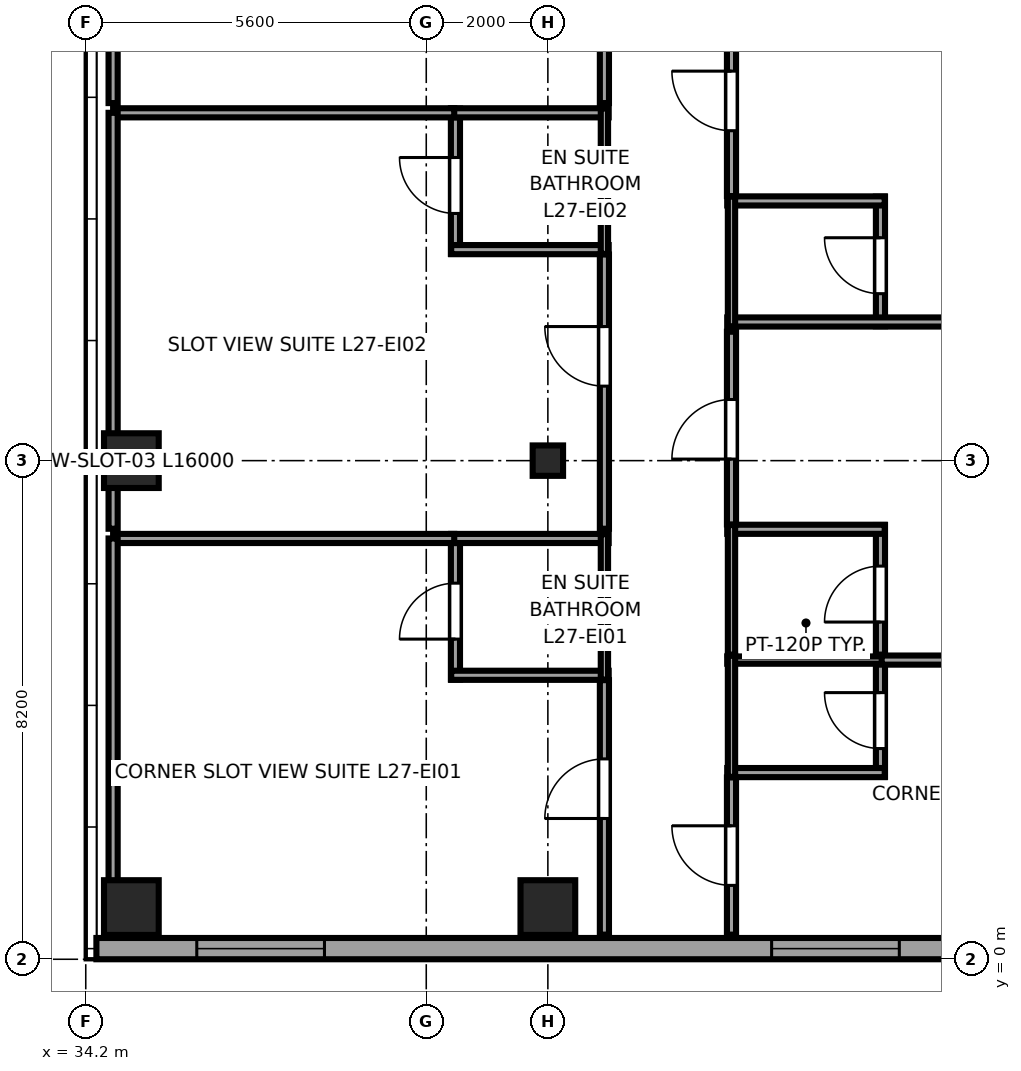
"""IFC4 building model, lengths in metres.
Left out: names, types, materials, properties, quantities, classifications, styles, units other than length and angle.
Written with IfcOpenShell. Run it as: python <this file> out.ifc"""

import sys

from ifc_helpers import new_model, si_unit, direction, frame, frame_2d, origin, origin_2d, place, context, subcontext, project, spatial, rectangle, i_section, extrude, source, transform, mapped, element, fill, save


model = new_model("IFC4")
c1 = context("Model", 3, precision=1e-05, world=origin(), true_north=direction((0.0, 1.0)))
c2 = subcontext(c1, "Body", "Model", "MODEL_VIEW")
j1 = project(units=[si_unit("LENGTHUNIT", "METRE"), si_unit("PLANEANGLEUNIT", "RADIAN")], contexts=[c1])
p1 = place(None, origin())
s1 = spatial("IfcSite", under=j1, at=p1, CompositionType="ELEMENT")
p2 = place(p1, origin())
s2 = spatial("IfcBuilding", under=s1, at=p2, CompositionType="ELEMENT")
p3 = place(p2, frame((0.0, 0.0, 108.0)))
s3 = spatial("IfcBuildingStorey", under=s2, at=p3, CompositionType="ELEMENT", Elevation=108.0)
m1 = source(origin(), c2, "Body", "SweptSolid", [
    extrude(rectangle(XDim=0.9, YDim=0.9, at=origin_2d()), origin(), (0.0, 0.0, 1.0), 3.55),
])
for number, where, z_axis, x_axis in (
    (1, (34.95, 0.85, 0.0), (0.0, 0.0, 1.0), (1.0, 0.0, 0.0)),
    (2, (34.95, 8.2, 0.0), (0.0, 0.0, 1.0), (1.0, 0.0, 0.0)),
    (3, (41.8, 0.85, 0.0), (0.0, 0.0, 1.0), (1.0, 0.0, 0.0)),
):
    element("IfcColumn", number, at=place(p3, frame(where, z_axis=z_axis, x_axis=x_axis)), inside=s3, PredefinedType="COLUMN", context=c2, shape_type="MappedRepresentation", body=[
        mapped(m1, transform((0.0, 0.0, 0.0), x_axis=(1.0, 0.0, 0.0), y_axis=(0.0, 1.0, 0.0), z_axis=(0.0, 0.0, 1.0), scale=1.0)),
    ])
m2 = source(origin(), c2, "Body", "SweptSolid", [
    extrude(i_section(OverallWidth=0.5, OverallDepth=0.5, WebThickness=0.022, FlangeThickness=0.034, at=origin_2d()), origin(), (0.0, 0.0, 1.0), 3.55),
])
p4 = place(p3, frame((41.8, 8.2, 0.0), z_axis=(0.0, 0.0, 1.0), x_axis=(1.0, 0.0, 0.0)))
e4 = element("IfcColumn", 4, at=p4, inside=s3, PredefinedType="COLUMN", context=c2, shape_type="MappedRepresentation", body=[
    mapped(m2, transform((0.0, 0.0, 0.0), x_axis=(1.0, 0.0, 0.0), y_axis=(0.0, 1.0, 0.0), z_axis=(0.0, 0.0, 1.0), scale=1.0)),
])
p5 = place(p3, frame((34.375, 0.175, 0.0), z_axis=(0.0, 0.0, 1.0), x_axis=(1.0, 0.0, 0.0)))
e5 = element("IfcWall", 5, at=p5, inside=s3, PredefinedType="SOLIDWALL", context=c2, shape_type="SweptSolid", body=[
    extrude(rectangle(XDim=18.008, YDim=0.35, at=frame_2d((9.004, 0.0))), origin(), (0.0, 0.0, 1.0), 3.37),
])
p6 = place(p5, frame((1.651, 0.0, 0.68)))
e6 = element("IfcOpeningElement", 6, at=p6, cuts=e5, PredefinedType="OPENING", context=c2, shape_type="SweptSolid", body=[
    extrude(rectangle(XDim=2.1, YDim=1.9, at=frame_2d((1.05, 0.95))), frame((0.0, 0.185, 0.0), z_axis=(0.0, -1.0, 0.0), x_axis=(1.0, 0.0, 0.0)), (0.0, 0.0, 1.0), 0.37),
])
p7 = place(p5, frame((11.105, 0.0, 0.68)))
e7 = element("IfcOpeningElement", 7, at=p7, cuts=e5, PredefinedType="OPENING", context=c2, shape_type="SweptSolid", body=[
    extrude(rectangle(XDim=2.1, YDim=1.9, at=frame_2d((1.05, 0.95))), frame((0.0, 0.185, 0.0), z_axis=(0.0, -1.0, 0.0), x_axis=(1.0, 0.0, 0.0)), (0.0, 0.0, 1.0), 0.37),
])
p8 = place(p3, frame((40.28, 4.6, 0.0), z_axis=(0.0, 0.0, 1.0), x_axis=(0.0, 1.0, 0.0)))
e8 = element("IfcWall", 8, at=p8, inside=s3, PredefinedType="PARTITIONING", context=c2, shape_type="SweptSolid", body=[
    extrude(rectangle(XDim=2.39, YDim=0.15, at=frame_2d((1.195, 0.0))), origin(), (0.0, 0.0, 1.0), 3.37),
])
p9 = place(p8, frame((0.665, 0.0, 0.0)))
e9 = element("IfcOpeningElement", 9, at=p9, cuts=e8, PredefinedType="OPENING", context=c2, shape_type="SweptSolid", body=[
    extrude(rectangle(XDim=0.92, YDim=2.01, at=frame_2d((0.46, 1.005))), frame((0.0, 0.085, 0.0), z_axis=(0.0, -1.0, 0.0), x_axis=(1.0, 0.0, 0.0)), (0.0, 0.0, 1.0), 0.17),
])
for number, where, z_axis, x_axis in (
    (10, (40.21, 4.67, 0.0), (0.0, 0.0, 1.0), (1.0, 0.0, 0.0)),
    (11, (40.21, 6.92, 0.0), (0.0, 0.0, 1.0), (1.0, 0.0, 0.0)),
):
    element("IfcWall", number, at=place(p3, frame(where, z_axis=z_axis, x_axis=x_axis)), inside=s3, PredefinedType="PARTITIONING", context=c2, shape_type="SweptSolid", body=[
        extrude(rectangle(XDim=2.59, YDim=0.15, at=frame_2d((1.295, 0.0))), origin(), (0.0, 0.0, 1.0), 3.37),
    ])
p10 = place(p3, frame((42.73, 4.6, 0.0), z_axis=(0.0, 0.0, 1.0), x_axis=(0.0, 1.0, 0.0)))
e12 = element("IfcWall", 12, at=p10, inside=s3, PredefinedType="PLUMBINGWALL", context=c2, shape_type="SweptSolid", body=[
    extrude(rectangle(XDim=2.39, YDim=0.12, at=frame_2d((1.195, 0.0))), origin(), (0.0, 0.0, 1.0), 3.37),
])
p11 = place(p3, frame((40.28, 11.6, 0.0), z_axis=(0.0, 0.0, 1.0), x_axis=(0.0, 1.0, 0.0)))
e13 = element("IfcWall", 13, at=p11, inside=s3, PredefinedType="PARTITIONING", context=c2, shape_type="SweptSolid", body=[
    extrude(rectangle(XDim=2.39, YDim=0.15, at=frame_2d((1.195, 0.0))), origin(), (0.0, 0.0, 1.0), 3.37),
])
p12 = place(p11, frame((0.665, 0.0, 0.0)))
e14 = element("IfcOpeningElement", 14, at=p12, cuts=e13, PredefinedType="OPENING", context=c2, shape_type="SweptSolid", body=[
    extrude(rectangle(XDim=0.92, YDim=2.01, at=frame_2d((0.46, 1.005))), frame((0.0, 0.085, 0.0), z_axis=(0.0, -1.0, 0.0), x_axis=(1.0, 0.0, 0.0)), (0.0, 0.0, 1.0), 0.17),
])
for number, where, z_axis, x_axis in (
    (15, (40.21, 11.67, 0.0), (0.0, 0.0, 1.0), (1.0, 0.0, 0.0)),
    (16, (40.21, 13.92, 0.0), (0.0, 0.0, 1.0), (1.0, 0.0, 0.0)),
):
    element("IfcWall", number, at=place(p3, frame(where, z_axis=z_axis, x_axis=x_axis)), inside=s3, PredefinedType="PARTITIONING", context=c2, shape_type="SweptSolid", body=[
        extrude(rectangle(XDim=2.59, YDim=0.15, at=frame_2d((1.295, 0.0))), origin(), (0.0, 0.0, 1.0), 3.37),
    ])
p13 = place(p3, frame((42.73, 11.6, 0.0), z_axis=(0.0, 0.0, 1.0), x_axis=(0.0, 1.0, 0.0)))
e17 = element("IfcWall", 17, at=p13, inside=s3, PredefinedType="PLUMBINGWALL", context=c2, shape_type="SweptSolid", body=[
    extrude(rectangle(XDim=2.39, YDim=0.12, at=frame_2d((1.195, 0.0))), origin(), (0.0, 0.0, 1.0), 3.37),
])
p14 = place(p3, frame((47.27, 3.0, 0.0), z_axis=(0.0, 0.0, 1.0), x_axis=(0.0, 1.0, 0.0)))
e18 = element("IfcWall", 18, at=p14, inside=s3, PredefinedType="PARTITIONING", context=c2, shape_type="SweptSolid", body=[
    extrude(rectangle(XDim=1.99, YDim=0.15, at=frame_2d((0.995, 0.0))), origin(), (0.0, 0.0, 1.0), 3.37),
])
p15 = place(p14, frame((0.465, 0.0, 0.0)))
e19 = element("IfcOpeningElement", 19, at=p15, cuts=e18, PredefinedType="OPENING", context=c2, shape_type="SweptSolid", body=[
    extrude(rectangle(XDim=0.92, YDim=2.01, at=frame_2d((0.46, 1.005))), frame((0.0, 0.085, 0.0), z_axis=(0.0, -1.0, 0.0), x_axis=(1.0, 0.0, 0.0)), (0.0, 0.0, 1.0), 0.17),
])
p16 = place(p3, frame((44.75, 3.07, 0.0), z_axis=(0.0, 0.0, 1.0), x_axis=(1.0, 0.0, 0.0)))
e20 = element("IfcWall", 20, at=p16, inside=s3, PredefinedType="PARTITIONING", context=c2, shape_type="SweptSolid", body=[
    extrude(rectangle(XDim=2.59, YDim=0.15, at=frame_2d((1.295, 0.0))), origin(), (0.0, 0.0, 1.0), 3.37),
])
p17 = place(p3, frame((44.75, 4.92, 0.0), z_axis=(0.0, 0.0, 1.0), x_axis=(1.0, 0.0, 0.0)))
e21 = element("IfcWall", 21, at=p17, inside=s3, PredefinedType="PLUMBINGWALL", context=c2, shape_type="SweptSolid", body=[
    extrude(rectangle(XDim=2.59, YDim=0.12, at=frame_2d((1.295, 0.0))), origin(), (0.0, 0.0, 1.0), 3.37),
])
p18 = place(p3, frame((44.82, 3.0, 0.0), z_axis=(0.0, 0.0, 1.0), x_axis=(0.0, 1.0, 0.0)))
e22 = element("IfcWall", 22, at=p18, inside=s3, PredefinedType="PLUMBINGWALL", context=c2, shape_type="SweptSolid", body=[
    extrude(rectangle(XDim=1.99, YDim=0.12, at=frame_2d((0.995, 0.0))), origin(), (0.0, 0.0, 1.0), 3.37),
])
p19 = place(p3, frame((47.27, 5.01, 0.0), z_axis=(0.0, 0.0, 1.0), x_axis=(0.0, 1.0, 0.0)))
e23 = element("IfcWall", 23, at=p19, inside=s3, PredefinedType="PARTITIONING", context=c2, shape_type="SweptSolid", body=[
    extrude(rectangle(XDim=2.131, YDim=0.15, at=frame_2d((1.065, 0.0))), origin(), (0.0, 0.0, 1.0), 3.37),
])
p20 = place(p19, frame((0.535, 0.0, 0.0)))
e24 = element("IfcOpeningElement", 24, at=p20, cuts=e23, PredefinedType="OPENING", context=c2, shape_type="SweptSolid", body=[
    extrude(rectangle(XDim=0.92, YDim=2.01, at=frame_2d((0.46, 1.005))), frame((0.0, 0.085, 0.0), z_axis=(0.0, -1.0, 0.0), x_axis=(1.0, 0.0, 0.0)), (0.0, 0.0, 1.0), 0.17),
])
p21 = place(p3, frame((44.75, 7.071, 0.0), z_axis=(0.0, 0.0, 1.0), x_axis=(1.0, 0.0, 0.0)))
e25 = element("IfcWall", 25, at=p21, inside=s3, PredefinedType="PARTITIONING", context=c2, shape_type="SweptSolid", body=[
    extrude(rectangle(XDim=2.59, YDim=0.15, at=frame_2d((1.295, 0.0))), origin(), (0.0, 0.0, 1.0), 3.37),
])
p22 = place(p3, frame((44.82, 5.01, 0.0), z_axis=(0.0, 0.0, 1.0), x_axis=(0.0, 1.0, 0.0)))
e26 = element("IfcWall", 26, at=p22, inside=s3, PredefinedType="PLUMBINGWALL", context=c2, shape_type="SweptSolid", body=[
    extrude(rectangle(XDim=2.131, YDim=0.12, at=frame_2d((1.065, 0.0))), origin(), (0.0, 0.0, 1.0), 3.37),
])
p23 = place(p3, frame((47.27, 10.41, 0.0), z_axis=(0.0, 0.0, 1.0), x_axis=(0.0, 1.0, 0.0)))
e27 = element("IfcWall", 27, at=p23, inside=s3, PredefinedType="PARTITIONING", context=c2, shape_type="SweptSolid", body=[
    extrude(rectangle(XDim=2.131, YDim=0.15, at=frame_2d((1.065, 0.0))), origin(), (0.0, 0.0, 1.0), 3.37),
])
p24 = place(p23, frame((0.535, 0.0, 0.0)))
e28 = element("IfcOpeningElement", 28, at=p24, cuts=e27, PredefinedType="OPENING", context=c2, shape_type="SweptSolid", body=[
    extrude(rectangle(XDim=0.92, YDim=2.01, at=frame_2d((0.46, 1.005))), frame((0.0, 0.085, 0.0), z_axis=(0.0, -1.0, 0.0), x_axis=(1.0, 0.0, 0.0)), (0.0, 0.0, 1.0), 0.17),
])
p25 = place(p3, frame((44.75, 10.48, 0.0), z_axis=(0.0, 0.0, 1.0), x_axis=(1.0, 0.0, 0.0)))
e29 = element("IfcWall", 29, at=p25, inside=s3, PredefinedType="PARTITIONING", context=c2, shape_type="SweptSolid", body=[
    extrude(rectangle(XDim=11.845, YDim=0.15, at=frame_2d((5.922, 0.0))), origin(), (0.0, 0.0, 1.0), 3.37),
])
p26 = place(p3, frame((44.75, 12.471, 0.0), z_axis=(0.0, 0.0, 1.0), x_axis=(1.0, 0.0, 0.0)))
e30 = element("IfcWall", 30, at=p26, inside=s3, PredefinedType="PARTITIONING", context=c2, shape_type="SweptSolid", body=[
    extrude(rectangle(XDim=2.59, YDim=0.15, at=frame_2d((1.295, 0.0))), origin(), (0.0, 0.0, 1.0), 3.37),
])
p27 = place(p3, frame((44.82, 10.41, 0.0), z_axis=(0.0, 0.0, 1.0), x_axis=(0.0, 1.0, 0.0)))
e31 = element("IfcWall", 31, at=p27, inside=s3, PredefinedType="PLUMBINGWALL", context=c2, shape_type="SweptSolid", body=[
    extrude(rectangle(XDim=2.131, YDim=0.12, at=frame_2d((1.065, 0.0))), origin(), (0.0, 0.0, 1.0), 3.37),
])
p28 = place(p3, frame((42.73, 0.405, 0.0), z_axis=(0.0, 0.0, 1.0), x_axis=(0.0, 1.0, 0.0)))
e32 = element("IfcWall", 32, at=p28, inside=s3, PredefinedType="PARTITIONING", context=c2, shape_type="SweptSolid", body=[
    extrude(rectangle(XDim=4.185, YDim=0.15, at=frame_2d((2.093, 0.0))), origin(), (0.0, 0.0, 1.0), 3.37),
])
p29 = place(p28, frame((1.91, 0.0, 0.0)))
e33 = element("IfcOpeningElement", 33, at=p29, cuts=e32, PredefinedType="OPENING", context=c2, shape_type="SweptSolid", body=[
    extrude(rectangle(XDim=0.98, YDim=2.12, at=frame_2d((0.49, 1.06))), frame((0.0, 0.085, 0.0), z_axis=(0.0, -1.0, 0.0), x_axis=(1.0, 0.0, 0.0)), (0.0, 0.0, 1.0), 0.17),
])
p30 = place(p3, frame((34.65, 6.92, 0.0), z_axis=(0.0, 0.0, 1.0), x_axis=(1.0, 0.0, 0.0)))
e34 = element("IfcWall", 34, at=p30, inside=s3, PredefinedType="PARTITIONING", context=c2, shape_type="SweptSolid", body=[
    extrude(rectangle(XDim=5.61, YDim=0.15, at=frame_2d((2.805, 0.0))), origin(), (0.0, 0.0, 1.0), 3.37),
])
p31 = place(p3, frame((34.65, 0.405, 0.0), z_axis=(0.0, 0.0, 1.0), x_axis=(0.0, 1.0, 0.0)))
e35 = element("IfcWall", 35, at=p31, inside=s3, PredefinedType="PARTITIONING", context=c2, shape_type="SweptSolid", body=[
    extrude(rectangle(XDim=6.515, YDim=0.15, at=frame_2d((3.257, 0.0))), origin(), (0.0, 0.0, 1.0), 3.37),
])
p32 = place(p3, frame((42.73, 7.08, 0.0), z_axis=(0.0, 0.0, 1.0), x_axis=(0.0, 1.0, 0.0)))
e36 = element("IfcWall", 36, at=p32, inside=s3, PredefinedType="PARTITIONING", context=c2, shape_type="SweptSolid", body=[
    extrude(rectangle(XDim=4.51, YDim=0.15, at=frame_2d((2.255, 0.0))), origin(), (0.0, 0.0, 1.0), 3.37),
])
p33 = place(p32, frame((2.345, 0.0, 0.0)))
e37 = element("IfcOpeningElement", 37, at=p33, cuts=e36, PredefinedType="OPENING", context=c2, shape_type="SweptSolid", body=[
    extrude(rectangle(XDim=0.98, YDim=2.12, at=frame_2d((0.49, 1.06))), frame((0.0, 0.085, 0.0), z_axis=(0.0, -1.0, 0.0), x_axis=(1.0, 0.0, 0.0)), (0.0, 0.0, 1.0), 0.17),
])
p34 = place(p3, frame((34.65, 13.92, 0.0), z_axis=(0.0, 0.0, 1.0), x_axis=(1.0, 0.0, 0.0)))
e38 = element("IfcWall", 38, at=p34, inside=s3, PredefinedType="PARTITIONING", context=c2, shape_type="SweptSolid", body=[
    extrude(rectangle(XDim=5.61, YDim=0.15, at=frame_2d((2.805, 0.0))), origin(), (0.0, 0.0, 1.0), 3.37),
])
p35 = place(p3, frame((34.65, 7.08, 0.0), z_axis=(0.0, 0.0, 1.0), x_axis=(0.0, 1.0, 0.0)))
e39 = element("IfcWall", 39, at=p35, inside=s3, PredefinedType="PARTITIONING", context=c2, shape_type="SweptSolid", body=[
    extrude(rectangle(XDim=6.84, YDim=0.15, at=frame_2d((3.42, 0.0))), origin(), (0.0, 0.0, 1.0), 3.37),
])
p36 = place(p3, frame((42.73, 14.08, 0.0), z_axis=(0.0, 0.0, 1.0), x_axis=(0.0, 1.0, 0.0)))
e40 = element("IfcWall", 40, at=p36, inside=s3, PredefinedType="PARTITIONING", context=c2, shape_type="SweptSolid", body=[
    extrude(rectangle(XDim=4.61, YDim=0.15, at=frame_2d((2.305, 0.0))), origin(), (0.0, 0.0, 1.0), 3.37),
])
p37 = place(p36, frame((3.145, 0.0, 0.0)))
e41 = element("IfcOpeningElement", 41, at=p37, cuts=e40, PredefinedType="OPENING", context=c2, shape_type="SweptSolid", body=[
    extrude(rectangle(XDim=0.98, YDim=2.12, at=frame_2d((0.49, 1.06))), frame((0.0, 0.085, 0.0), z_axis=(0.0, -1.0, 0.0), x_axis=(1.0, 0.0, 0.0)), (0.0, 0.0, 1.0), 0.17),
])
p38 = place(p3, frame((34.65, 14.08, 0.0), z_axis=(0.0, 0.0, 1.0), x_axis=(0.0, 1.0, 0.0)))
e42 = element("IfcWall", 42, at=p38, inside=s3, PredefinedType="PARTITIONING", context=c2, shape_type="SweptSolid", body=[
    extrude(rectangle(XDim=6.94, YDim=0.15, at=frame_2d((3.47, 0.0))), origin(), (0.0, 0.0, 1.0), 3.37),
])
p39 = place(p3, frame((44.82, 0.405, 0.0), z_axis=(0.0, 0.0, 1.0), x_axis=(0.0, 1.0, 0.0)))
e43 = element("IfcWall", 43, at=p39, inside=s3, PredefinedType="PARTITIONING", context=c2, shape_type="SweptSolid", body=[
    extrude(rectangle(XDim=2.585, YDim=0.15, at=frame_2d((1.292, 0.0))), origin(), (0.0, 0.0, 1.0), 3.37),
])
p40 = place(p39, frame((0.81, 0.0, 0.0)))
e44 = element("IfcOpeningElement", 44, at=p40, cuts=e43, PredefinedType="OPENING", context=c2, shape_type="SweptSolid", body=[
    extrude(rectangle(XDim=0.98, YDim=2.12, at=frame_2d((0.49, 1.06))), frame((0.0, 0.085, 0.0), z_axis=(0.0, -1.0, 0.0), x_axis=(1.0, 0.0, 0.0)), (0.0, 0.0, 1.0), 0.17),
])
p41 = place(p3, frame((47.29, 4.92, 0.0), z_axis=(0.0, 0.0, 1.0), x_axis=(1.0, 0.0, 0.0)))
e45 = element("IfcWall", 45, at=p41, inside=s3, PredefinedType="PARTITIONING", context=c2, shape_type="SweptSolid", body=[
    extrude(rectangle(XDim=9.305, YDim=0.15, at=frame_2d((4.652, 0.0))), origin(), (0.0, 0.0, 1.0), 3.37),
])
p42 = place(p3, frame((44.82, 7.151, 0.0), z_axis=(0.0, 0.0, 1.0), x_axis=(0.0, 1.0, 0.0)))
e46 = element("IfcWall", 46, at=p42, inside=s3, PredefinedType="PARTITIONING", context=c2, shape_type="SweptSolid", body=[
    extrude(rectangle(XDim=3.169, YDim=0.15, at=frame_2d((1.584, 0.0))), origin(), (0.0, 0.0, 1.0), 3.37),
])
p43 = place(p42, frame((1.074, 0.0, 0.0)))
e47 = element("IfcOpeningElement", 47, at=p43, cuts=e46, PredefinedType="OPENING", context=c2, shape_type="SweptSolid", body=[
    extrude(rectangle(XDim=0.98, YDim=2.12, at=frame_2d((0.49, 1.06))), frame((0.0, 0.085, 0.0), z_axis=(0.0, -1.0, 0.0), x_axis=(1.0, 0.0, 0.0)), (0.0, 0.0, 1.0), 0.17),
])
p44 = place(p3, frame((44.82, 12.551, 0.0), z_axis=(0.0, 0.0, 1.0), x_axis=(0.0, 1.0, 0.0)))
e48 = element("IfcWall", 48, at=p44, inside=s3, PredefinedType="PARTITIONING", context=c2, shape_type="SweptSolid", body=[
    extrude(rectangle(XDim=3.169, YDim=0.15, at=frame_2d((1.584, 0.0))), origin(), (0.0, 0.0, 1.0), 3.37),
])
p45 = place(p44, frame((1.074, 0.0, 0.0)))
e49 = element("IfcOpeningElement", 49, at=p45, cuts=e48, PredefinedType="OPENING", context=c2, shape_type="SweptSolid", body=[
    extrude(rectangle(XDim=0.98, YDim=2.12, at=frame_2d((0.49, 1.06))), frame((0.0, 0.085, 0.0), z_axis=(0.0, -1.0, 0.0), x_axis=(1.0, 0.0, 0.0)), (0.0, 0.0, 1.0), 0.17),
])
m3 = source(origin(), c2, "Body", "SweptSolid", [
    extrude(rectangle(XDim=2.1, YDim=1.9, at=frame_2d((1.05, 0.95))), frame((0.0, 0.09, 0.0), z_axis=(0.0, -1.0, 0.0), x_axis=(1.0, 0.0, 0.0)), (0.0, 0.0, 1.0), 0.06),
])
p46 = place(p6, origin())
e50 = element("IfcWindow", 50, at=p46, inside=s3, PartitioningType="TRIPLE_PANEL_HORIZONTAL", PredefinedType="WINDOW", context=c2, shape_type="MappedRepresentation", body=[
    mapped(m3, transform((0.0, 0.0, 0.0), x_axis=(1.0, 0.0, 0.0), y_axis=(0.0, 1.0, 0.0), z_axis=(0.0, 0.0, 1.0), scale=1.0)),
])
fill(e6, e50)
p47 = place(p7, origin())
e51 = element("IfcWindow", 51, at=p47, inside=s3, PartitioningType="TRIPLE_PANEL_HORIZONTAL", PredefinedType="WINDOW", context=c2, shape_type="MappedRepresentation", body=[
    mapped(m3, transform((0.0, 0.0, 0.0), x_axis=(1.0, 0.0, 0.0), y_axis=(0.0, 1.0, 0.0), z_axis=(0.0, 0.0, 1.0), scale=1.0)),
])
fill(e7, e51)
m4 = source(origin(), c2, "Body", "SweptSolid", [
    extrude(rectangle(XDim=0.92, YDim=2.01, at=frame_2d((0.46, 1.005))), frame((0.0, 0.025, 0.0), z_axis=(0.0, -1.0, 0.0), x_axis=(1.0, 0.0, 0.0)), (0.0, 0.0, 1.0), 0.05),
])
p48 = place(p9, origin())
e52 = element("IfcDoor", 52, at=p48, inside=s3, OperationType="SINGLE_SWING_LEFT", PredefinedType="DOOR", context=c2, shape_type="MappedRepresentation", body=[
    mapped(m4, transform((0.0, 0.0, 0.0), x_axis=(1.0, 0.0, 0.0), y_axis=(0.0, 1.0, 0.0), z_axis=(0.0, 0.0, 1.0), scale=1.0)),
])
fill(e9, e52)
p49 = place(p12, origin())
e53 = element("IfcDoor", 53, at=p49, inside=s3, OperationType="SINGLE_SWING_RIGHT", PredefinedType="DOOR", context=c2, shape_type="MappedRepresentation", body=[
    mapped(m4, transform((0.0, 0.0, 0.0), x_axis=(1.0, 0.0, 0.0), y_axis=(0.0, 1.0, 0.0), z_axis=(0.0, 0.0, 1.0), scale=1.0)),
])
fill(e14, e53)
p50 = place(p15, origin())
e54 = element("IfcDoor", 54, at=p50, inside=s3, OperationType="SINGLE_SWING_RIGHT", PredefinedType="DOOR", context=c2, shape_type="MappedRepresentation", body=[
    mapped(m4, transform((0.0, 0.0, 0.0), x_axis=(1.0, 0.0, 0.0), y_axis=(0.0, 1.0, 0.0), z_axis=(0.0, 0.0, 1.0), scale=1.0)),
])
fill(e19, e54)
p51 = place(p20, origin())
e55 = element("IfcDoor", 55, at=p51, inside=s3, OperationType="SINGLE_SWING_LEFT", PredefinedType="DOOR", context=c2, shape_type="MappedRepresentation", body=[
    mapped(m4, transform((0.0, 0.0, 0.0), x_axis=(1.0, 0.0, 0.0), y_axis=(0.0, 1.0, 0.0), z_axis=(0.0, 0.0, 1.0), scale=1.0)),
])
fill(e24, e55)
p52 = place(p24, origin())
e56 = element("IfcDoor", 56, at=p52, inside=s3, OperationType="SINGLE_SWING_RIGHT", PredefinedType="DOOR", context=c2, shape_type="MappedRepresentation", body=[
    mapped(m4, transform((0.0, 0.0, 0.0), x_axis=(1.0, 0.0, 0.0), y_axis=(0.0, 1.0, 0.0), z_axis=(0.0, 0.0, 1.0), scale=1.0)),
])
fill(e28, e56)
m5 = source(origin(), c2, "Body", "SweptSolid", [
    extrude(rectangle(XDim=0.98, YDim=2.12, at=frame_2d((0.49, 1.06))), frame((0.0, 0.025, 0.0), z_axis=(0.0, -1.0, 0.0), x_axis=(1.0, 0.0, 0.0)), (0.0, 0.0, 1.0), 0.05),
])
p53 = place(p29, origin())
e57 = element("IfcDoor", 57, at=p53, inside=s3, OperationType="SINGLE_SWING_LEFT", PredefinedType="DOOR", context=c2, shape_type="MappedRepresentation", body=[
    mapped(m5, transform((0.0, 0.0, 0.0), x_axis=(1.0, 0.0, 0.0), y_axis=(0.0, 1.0, 0.0), z_axis=(0.0, 0.0, 1.0), scale=1.0)),
])
fill(e33, e57)
p54 = place(p33, origin())
e58 = element("IfcDoor", 58, at=p54, inside=s3, OperationType="SINGLE_SWING_RIGHT", PredefinedType="DOOR", context=c2, shape_type="MappedRepresentation", body=[
    mapped(m5, transform((0.0, 0.0, 0.0), x_axis=(1.0, 0.0, 0.0), y_axis=(0.0, 1.0, 0.0), z_axis=(0.0, 0.0, 1.0), scale=1.0)),
])
fill(e37, e58)
p55 = place(p40, origin())
e59 = element("IfcDoor", 59, at=p55, inside=s3, OperationType="SINGLE_SWING_RIGHT", PredefinedType="DOOR", context=c2, shape_type="MappedRepresentation", body=[
    mapped(m5, transform((0.0, 0.0, 0.0), x_axis=(1.0, 0.0, 0.0), y_axis=(0.0, 1.0, 0.0), z_axis=(0.0, 0.0, 1.0), scale=1.0)),
])
fill(e44, e59)
p56 = place(p43, origin())
e60 = element("IfcDoor", 60, at=p56, inside=s3, OperationType="SINGLE_SWING_LEFT", PredefinedType="DOOR", context=c2, shape_type="MappedRepresentation", body=[
    mapped(m5, transform((0.0, 0.0, 0.0), x_axis=(1.0, 0.0, 0.0), y_axis=(0.0, 1.0, 0.0), z_axis=(0.0, 0.0, 1.0), scale=1.0)),
])
fill(e47, e60)
p57 = place(p45, origin())
e61 = element("IfcDoor", 61, at=p57, inside=s3, OperationType="SINGLE_SWING_RIGHT", PredefinedType="DOOR", context=c2, shape_type="MappedRepresentation", body=[
    mapped(m5, transform((0.0, 0.0, 0.0), x_axis=(1.0, 0.0, 0.0), y_axis=(0.0, 1.0, 0.0), z_axis=(0.0, 0.0, 1.0), scale=1.0)),
])
fill(e49, e61)
save(model, sys.argv[1])
